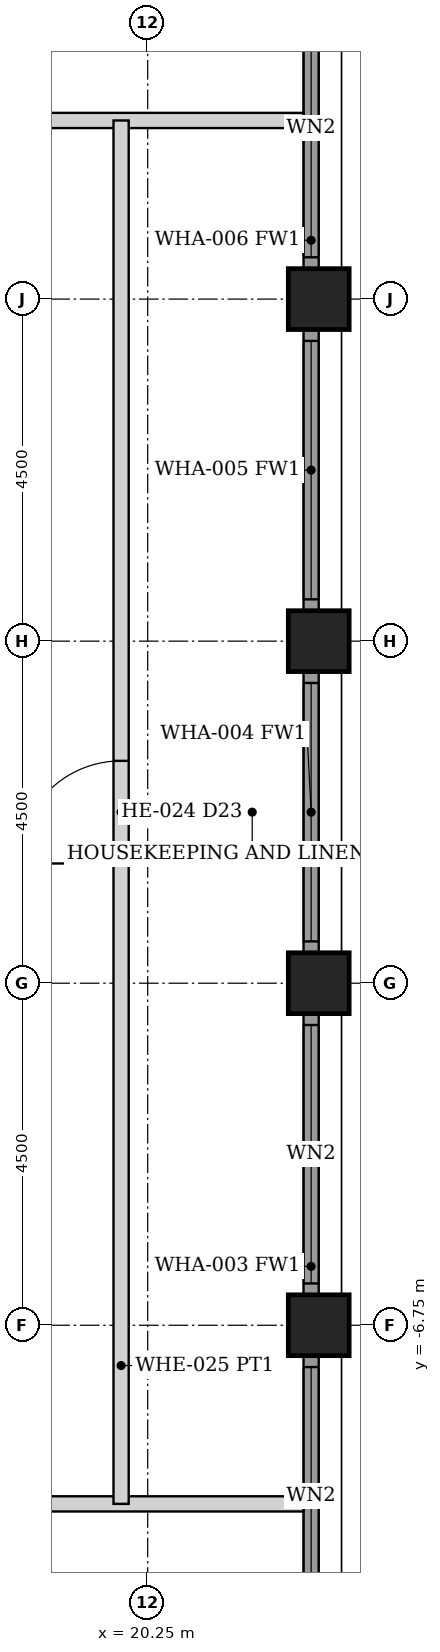
"""IFC4 building model, lengths in metres.
Left out: names, types, materials, properties, quantities, classifications, styles, units other than length and angle.
Written with IfcOpenShell. Run it as: python <this file> out.ifc"""

import sys

from ifc_helpers import new_model, si_unit, direction, frame, frame_2d, origin, origin_2d, place, context, subcontext, project, spatial, rectangle, hollow_rectangle, extrude, element, fill, save


model = new_model("IFC4")
c1 = context("Model", 3, precision=1e-05, world=origin(), true_north=direction((0.0, 1.0)))
c2 = subcontext(c1, "Body", "Model", "MODEL_VIEW")
j1 = project(units=[si_unit("LENGTHUNIT", "METRE"), si_unit("PLANEANGLEUNIT", "RADIAN")], contexts=[c1])
p1 = place(None, origin())
s1 = spatial("IfcSite", under=j1, at=p1, CompositionType="ELEMENT")
p2 = place(p1, origin())
s2 = spatial("IfcBuilding", under=s1, at=p2, CompositionType="ELEMENT")
p3 = place(p2, frame((0.0, 0.0, 161.6)))
s3 = spatial("IfcBuildingStorey", under=s2, at=p3, CompositionType="ELEMENT", Elevation=161.6)
for number, where, z_axis, x_axis in (
    (1, (22.5, -6.75, 0.0), (0.0, 0.0, 1.0), (1.0, 0.0, 0.0)),
    (2, (22.5, -2.25, 0.0), (0.0, 0.0, 1.0), (1.0, 0.0, 0.0)),
    (3, (22.5, 2.25, 0.0), (0.0, 0.0, 1.0), (1.0, 0.0, 0.0)),
    (4, (22.5, 6.75, 0.0), (0.0, 0.0, 1.0), (1.0, 0.0, 0.0)),
):
    element("IfcColumn", number, at=place(p3, frame(where, z_axis=z_axis, x_axis=x_axis)), inside=s3, PredefinedType="COLUMN", context=c2, shape_type="SweptSolid", body=[
        extrude(hollow_rectangle(XDim=0.8, YDim=0.8, WallThickness=0.05, at=origin_2d()), origin(), (0.0, 0.0, 1.0), 3.6),
    ])
p4 = place(p3, frame((22.4, -10.845, 0.0), z_axis=(0.0, 0.0, 1.0), x_axis=(0.0, 1.0, 0.0)))
e5 = element("IfcWall", 5, at=p4, inside=s3, PredefinedType="SOLIDWALL", context=c2, shape_type="SweptSolid", body=[
    extrude(rectangle(XDim=3.69, YDim=0.2, at=frame_2d((1.845, 0.0))), origin(), (0.0, 0.0, 1.0), 2.479),
])
p5 = place(p4, frame((0.145, 0.0, 0.3)))
e6 = element("IfcOpeningElement", 6, at=p5, cuts=e5, PredefinedType="OPENING", context=c2, shape_type="SweptSolid", body=[
    extrude(rectangle(XDim=3.4, YDim=2.029, at=frame_2d((1.7, 1.015))), frame((0.0, 0.11, 0.0), z_axis=(0.0, -1.0, 0.0), x_axis=(1.0, 0.0, 0.0)), (0.0, 0.0, 1.0), 0.22),
])
p6 = place(p3, frame((22.4, -6.345, 0.0), z_axis=(0.0, 0.0, 1.0), x_axis=(0.0, 1.0, 0.0)))
e7 = element("IfcWall", 7, at=p6, inside=s3, PredefinedType="SOLIDWALL", context=c2, shape_type="SweptSolid", body=[
    extrude(rectangle(XDim=3.69, YDim=0.2, at=frame_2d((1.845, 0.0))), origin(), (0.0, 0.0, 1.0), 2.479),
])
p7 = place(p6, frame((0.145, 0.0, 0.3)))
e8 = element("IfcOpeningElement", 8, at=p7, cuts=e7, PredefinedType="OPENING", context=c2, shape_type="SweptSolid", body=[
    extrude(rectangle(XDim=3.4, YDim=2.029, at=frame_2d((1.7, 1.015))), frame((0.0, 0.11, 0.0), z_axis=(0.0, -1.0, 0.0), x_axis=(1.0, 0.0, 0.0)), (0.0, 0.0, 1.0), 0.22),
])
p8 = place(p3, frame((22.4, -1.845, 0.0), z_axis=(0.0, 0.0, 1.0), x_axis=(0.0, 1.0, 0.0)))
e9 = element("IfcWall", 9, at=p8, inside=s3, PredefinedType="SOLIDWALL", context=c2, shape_type="SweptSolid", body=[
    extrude(rectangle(XDim=3.69, YDim=0.2, at=frame_2d((1.845, 0.0))), origin(), (0.0, 0.0, 1.0), 2.479),
])
p9 = place(p8, frame((0.145, 0.0, 0.3)))
e10 = element("IfcOpeningElement", 10, at=p9, cuts=e9, PredefinedType="OPENING", context=c2, shape_type="SweptSolid", body=[
    extrude(rectangle(XDim=3.4, YDim=2.029, at=frame_2d((1.7, 1.015))), frame((0.0, 0.11, 0.0), z_axis=(0.0, -1.0, 0.0), x_axis=(1.0, 0.0, 0.0)), (0.0, 0.0, 1.0), 0.22),
])
p10 = place(p3, frame((22.4, 2.655, 0.0), z_axis=(0.0, 0.0, 1.0), x_axis=(0.0, 1.0, 0.0)))
e11 = element("IfcWall", 11, at=p10, inside=s3, PredefinedType="SOLIDWALL", context=c2, shape_type="SweptSolid", body=[
    extrude(rectangle(XDim=3.69, YDim=0.2, at=frame_2d((1.845, 0.0))), origin(), (0.0, 0.0, 1.0), 2.479),
])
p11 = place(p10, frame((0.145, 0.0, 0.3)))
e12 = element("IfcOpeningElement", 12, at=p11, cuts=e11, PredefinedType="OPENING", context=c2, shape_type="SweptSolid", body=[
    extrude(rectangle(XDim=3.4, YDim=2.029, at=frame_2d((1.7, 1.015))), frame((0.0, 0.11, 0.0), z_axis=(0.0, -1.0, 0.0), x_axis=(1.0, 0.0, 0.0)), (0.0, 0.0, 1.0), 0.22),
])
p12 = place(p3, frame((22.4, 7.155, 0.0), z_axis=(0.0, 0.0, 1.0), x_axis=(0.0, 1.0, 0.0)))
e13 = element("IfcWall", 13, at=p12, inside=s3, PredefinedType="SOLIDWALL", context=c2, shape_type="SweptSolid", body=[
    extrude(rectangle(XDim=3.69, YDim=0.2, at=frame_2d((1.845, 0.0))), origin(), (0.0, 0.0, 1.0), 2.479),
])
p13 = place(p12, frame((0.145, 0.0, 0.3)))
e14 = element("IfcOpeningElement", 14, at=p13, cuts=e13, PredefinedType="OPENING", context=c2, shape_type="SweptSolid", body=[
    extrude(rectangle(XDim=3.4, YDim=2.029, at=frame_2d((1.7, 1.015))), frame((0.0, 0.11, 0.0), z_axis=(0.0, -1.0, 0.0), x_axis=(1.0, 0.0, 0.0)), (0.0, 0.0, 1.0), 0.22),
])
p14 = place(p3, frame((-22.3, 9.1, 0.0), z_axis=(0.0, 0.0, 1.0), x_axis=(1.0, 0.0, 0.0)))
e15 = element("IfcWall", 15, at=p14, inside=s3, PredefinedType="PARTITIONING", context=c2, shape_type="SweptSolid", body=[
    extrude(rectangle(XDim=44.6, YDim=0.2, at=frame_2d((22.3, 0.0))), origin(), (0.0, 0.0, 1.0), 2.473),
])
p15 = place(p14, frame((6.75, 0.0, 0.0)))
e16 = element("IfcOpeningElement", 16, at=p15, cuts=e15, PredefinedType="OPENING", context=c2, shape_type="SweptSolid", body=[
    extrude(rectangle(XDim=0.9, YDim=2.1, at=frame_2d((0.45, 1.05))), frame((0.0, 0.11, 0.0), z_axis=(0.0, -1.0, 0.0), x_axis=(1.0, 0.0, 0.0)), (0.0, 0.0, 1.0), 0.22),
])
p16 = place(p14, frame((15.75, 0.0, 0.0)))
e17 = element("IfcOpeningElement", 17, at=p16, cuts=e15, PredefinedType="OPENING", context=c2, shape_type="SweptSolid", body=[
    extrude(rectangle(XDim=0.9, YDim=2.1, at=frame_2d((0.45, 1.05))), frame((0.0, 0.11, 0.0), z_axis=(0.0, -1.0, 0.0), x_axis=(1.0, 0.0, 0.0)), (0.0, 0.0, 1.0), 0.22),
])
p17 = place(p14, frame((20.25, 0.0, 0.0)))
e18 = element("IfcOpeningElement", 18, at=p17, cuts=e15, PredefinedType="OPENING", context=c2, shape_type="SweptSolid", body=[
    extrude(rectangle(XDim=0.9, YDim=2.1, at=frame_2d((0.45, 1.05))), frame((0.0, 0.11, 0.0), z_axis=(0.0, -1.0, 0.0), x_axis=(1.0, 0.0, 0.0)), (0.0, 0.0, 1.0), 0.22),
])
p18 = place(p14, frame((36.95, 0.0, 0.0)))
e19 = element("IfcOpeningElement", 19, at=p18, cuts=e15, PredefinedType="OPENING", context=c2, shape_type="SweptSolid", body=[
    extrude(rectangle(XDim=0.9, YDim=2.1, at=frame_2d((0.45, 1.05))), frame((0.0, 0.11, 0.0), z_axis=(0.0, -1.0, 0.0), x_axis=(1.0, 0.0, 0.0)), (0.0, 0.0, 1.0), 0.22),
])
p19 = place(p14, frame((38.85, 0.0, 0.0)))
e20 = element("IfcOpeningElement", 20, at=p19, cuts=e15, PredefinedType="OPENING", context=c2, shape_type="SweptSolid", body=[
    extrude(rectangle(XDim=0.9, YDim=2.1, at=frame_2d((0.45, 1.05))), frame((0.0, 0.11, 0.0), z_axis=(0.0, -1.0, 0.0), x_axis=(1.0, 0.0, 0.0)), (0.0, 0.0, 1.0), 0.22),
])
p20 = place(p14, frame((4.85, 0.0, 0.0)))
e21 = element("IfcOpeningElement", 21, at=p20, cuts=e15, PredefinedType="OPENING", context=c2, shape_type="SweptSolid", body=[
    extrude(rectangle(XDim=0.9, YDim=2.1, at=frame_2d((0.45, 1.05))), frame((0.0, 0.11, 0.0), z_axis=(0.0, -1.0, 0.0), x_axis=(1.0, 0.0, 0.0)), (0.0, 0.0, 1.0), 0.22),
])
p21 = place(p3, frame((-22.3, -9.1, 0.0), z_axis=(0.0, 0.0, 1.0), x_axis=(1.0, 0.0, 0.0)))
e22 = element("IfcWall", 22, at=p21, inside=s3, PredefinedType="PARTITIONING", context=c2, shape_type="SweptSolid", body=[
    extrude(rectangle(XDim=44.6, YDim=0.2, at=frame_2d((22.3, 0.0))), origin(), (0.0, 0.0, 1.0), 2.473),
])
p22 = place(p21, frame((6.75, 0.0, 0.0)))
e23 = element("IfcOpeningElement", 23, at=p22, cuts=e22, PredefinedType="OPENING", context=c2, shape_type="SweptSolid", body=[
    extrude(rectangle(XDim=0.9, YDim=2.1, at=frame_2d((0.45, 1.05))), frame((0.0, 0.11, 0.0), z_axis=(0.0, -1.0, 0.0), x_axis=(1.0, 0.0, 0.0)), (0.0, 0.0, 1.0), 0.22),
])
p23 = place(p21, frame((23.45, 0.0, 0.0)))
e24 = element("IfcOpeningElement", 24, at=p23, cuts=e22, PredefinedType="OPENING", context=c2, shape_type="SweptSolid", body=[
    extrude(rectangle(XDim=0.9, YDim=2.1, at=frame_2d((0.45, 1.05))), frame((0.0, 0.11, 0.0), z_axis=(0.0, -1.0, 0.0), x_axis=(1.0, 0.0, 0.0)), (0.0, 0.0, 1.0), 0.22),
])
p24 = place(p21, frame((27.95, 0.0, 0.0)))
e25 = element("IfcOpeningElement", 25, at=p24, cuts=e22, PredefinedType="OPENING", context=c2, shape_type="SweptSolid", body=[
    extrude(rectangle(XDim=0.9, YDim=2.1, at=frame_2d((0.45, 1.05))), frame((0.0, 0.11, 0.0), z_axis=(0.0, -1.0, 0.0), x_axis=(1.0, 0.0, 0.0)), (0.0, 0.0, 1.0), 0.22),
])
p25 = place(p21, frame((36.95, 0.0, 0.0)))
e26 = element("IfcOpeningElement", 26, at=p25, cuts=e22, PredefinedType="OPENING", context=c2, shape_type="SweptSolid", body=[
    extrude(rectangle(XDim=0.9, YDim=2.1, at=frame_2d((0.45, 1.05))), frame((0.0, 0.11, 0.0), z_axis=(0.0, -1.0, 0.0), x_axis=(1.0, 0.0, 0.0)), (0.0, 0.0, 1.0), 0.22),
])
p26 = place(p21, frame((38.85, 0.0, 0.0)))
e27 = element("IfcOpeningElement", 27, at=p26, cuts=e22, PredefinedType="OPENING", context=c2, shape_type="SweptSolid", body=[
    extrude(rectangle(XDim=0.9, YDim=2.1, at=frame_2d((0.45, 1.05))), frame((0.0, 0.11, 0.0), z_axis=(0.0, -1.0, 0.0), x_axis=(1.0, 0.0, 0.0)), (0.0, 0.0, 1.0), 0.22),
])
p27 = place(p21, frame((4.85, 0.0, 0.0)))
e28 = element("IfcOpeningElement", 28, at=p27, cuts=e22, PredefinedType="OPENING", context=c2, shape_type="SweptSolid", body=[
    extrude(rectangle(XDim=0.9, YDim=2.1, at=frame_2d((0.45, 1.05))), frame((0.0, 0.11, 0.0), z_axis=(0.0, -1.0, 0.0), x_axis=(1.0, 0.0, 0.0)), (0.0, 0.0, 1.0), 0.22),
])
p28 = place(p3, frame((19.9, -9.1, 0.0), z_axis=(0.0, 0.0, 1.0), x_axis=(0.0, 1.0, 0.0)))
e29 = element("IfcWall", 29, at=p28, inside=s3, PredefinedType="PARTITIONING", context=c2, shape_type="SweptSolid", body=[
    extrude(rectangle(XDim=18.2, YDim=0.2, at=frame_2d((9.1, 0.0))), origin(), (0.0, 0.0, 1.0), 2.473),
])
p29 = place(p28, frame((8.425, 0.0, 0.0)))
e30 = element("IfcOpeningElement", 30, at=p29, cuts=e29, PredefinedType="OPENING", context=c2, shape_type="SweptSolid", body=[
    extrude(rectangle(XDim=1.35, YDim=2.1, at=frame_2d((0.675, 1.05))), frame((0.0, 0.11, 0.0), z_axis=(0.0, -1.0, 0.0), x_axis=(1.0, 0.0, 0.0)), (0.0, 0.0, 1.0), 0.22),
])
p30 = place(p5, origin())
e31 = element("IfcWindow", 31, at=p30, inside=s3, PartitioningType="SINGLE_PANEL", PredefinedType="WINDOW", context=c2, shape_type="SweptSolid", body=[
    extrude(rectangle(XDim=3.4, YDim=2.029, at=frame_2d((1.7, 1.015))), frame((0.0, 0.03, 0.0), z_axis=(0.0, -1.0, 0.0), x_axis=(1.0, 0.0, 0.0)), (0.0, 0.0, 1.0), 0.06),
])
fill(e6, e31)
p31 = place(p7, origin())
e32 = element("IfcWindow", 32, at=p31, inside=s3, PartitioningType="SINGLE_PANEL", PredefinedType="WINDOW", context=c2, shape_type="SweptSolid", body=[
    extrude(rectangle(XDim=3.4, YDim=2.029, at=frame_2d((1.7, 1.015))), frame((0.0, 0.03, 0.0), z_axis=(0.0, -1.0, 0.0), x_axis=(1.0, 0.0, 0.0)), (0.0, 0.0, 1.0), 0.06),
])
fill(e8, e32)
p32 = place(p9, origin())
e33 = element("IfcWindow", 33, at=p32, inside=s3, PartitioningType="SINGLE_PANEL", PredefinedType="WINDOW", context=c2, shape_type="SweptSolid", body=[
    extrude(rectangle(XDim=3.4, YDim=2.029, at=frame_2d((1.7, 1.015))), frame((0.0, 0.03, 0.0), z_axis=(0.0, -1.0, 0.0), x_axis=(1.0, 0.0, 0.0)), (0.0, 0.0, 1.0), 0.06),
])
fill(e10, e33)
p33 = place(p11, origin())
e34 = element("IfcWindow", 34, at=p33, inside=s3, PartitioningType="SINGLE_PANEL", PredefinedType="WINDOW", context=c2, shape_type="SweptSolid", body=[
    extrude(rectangle(XDim=3.4, YDim=2.029, at=frame_2d((1.7, 1.015))), frame((0.0, 0.03, 0.0), z_axis=(0.0, -1.0, 0.0), x_axis=(1.0, 0.0, 0.0)), (0.0, 0.0, 1.0), 0.06),
])
fill(e12, e34)
p34 = place(p13, origin())
e35 = element("IfcWindow", 35, at=p34, inside=s3, PartitioningType="SINGLE_PANEL", PredefinedType="WINDOW", context=c2, shape_type="SweptSolid", body=[
    extrude(rectangle(XDim=3.4, YDim=2.029, at=frame_2d((1.7, 1.015))), frame((0.0, 0.03, 0.0), z_axis=(0.0, -1.0, 0.0), x_axis=(1.0, 0.0, 0.0)), (0.0, 0.0, 1.0), 0.06),
])
fill(e14, e35)
p35 = place(p29, origin())
e36 = element("IfcDoor", 36, at=p35, inside=s3, OperationType="SINGLE_SWING_LEFT", PredefinedType="DOOR", context=c2, shape_type="SweptSolid", body=[
    extrude(rectangle(XDim=1.35, YDim=2.1, at=frame_2d((0.675, 1.05))), frame((0.0, 0.025, 0.0), z_axis=(0.0, -1.0, 0.0), x_axis=(1.0, 0.0, 0.0)), (0.0, 0.0, 1.0), 0.05),
])
fill(e30, e36)
save(model, sys.argv[1])
